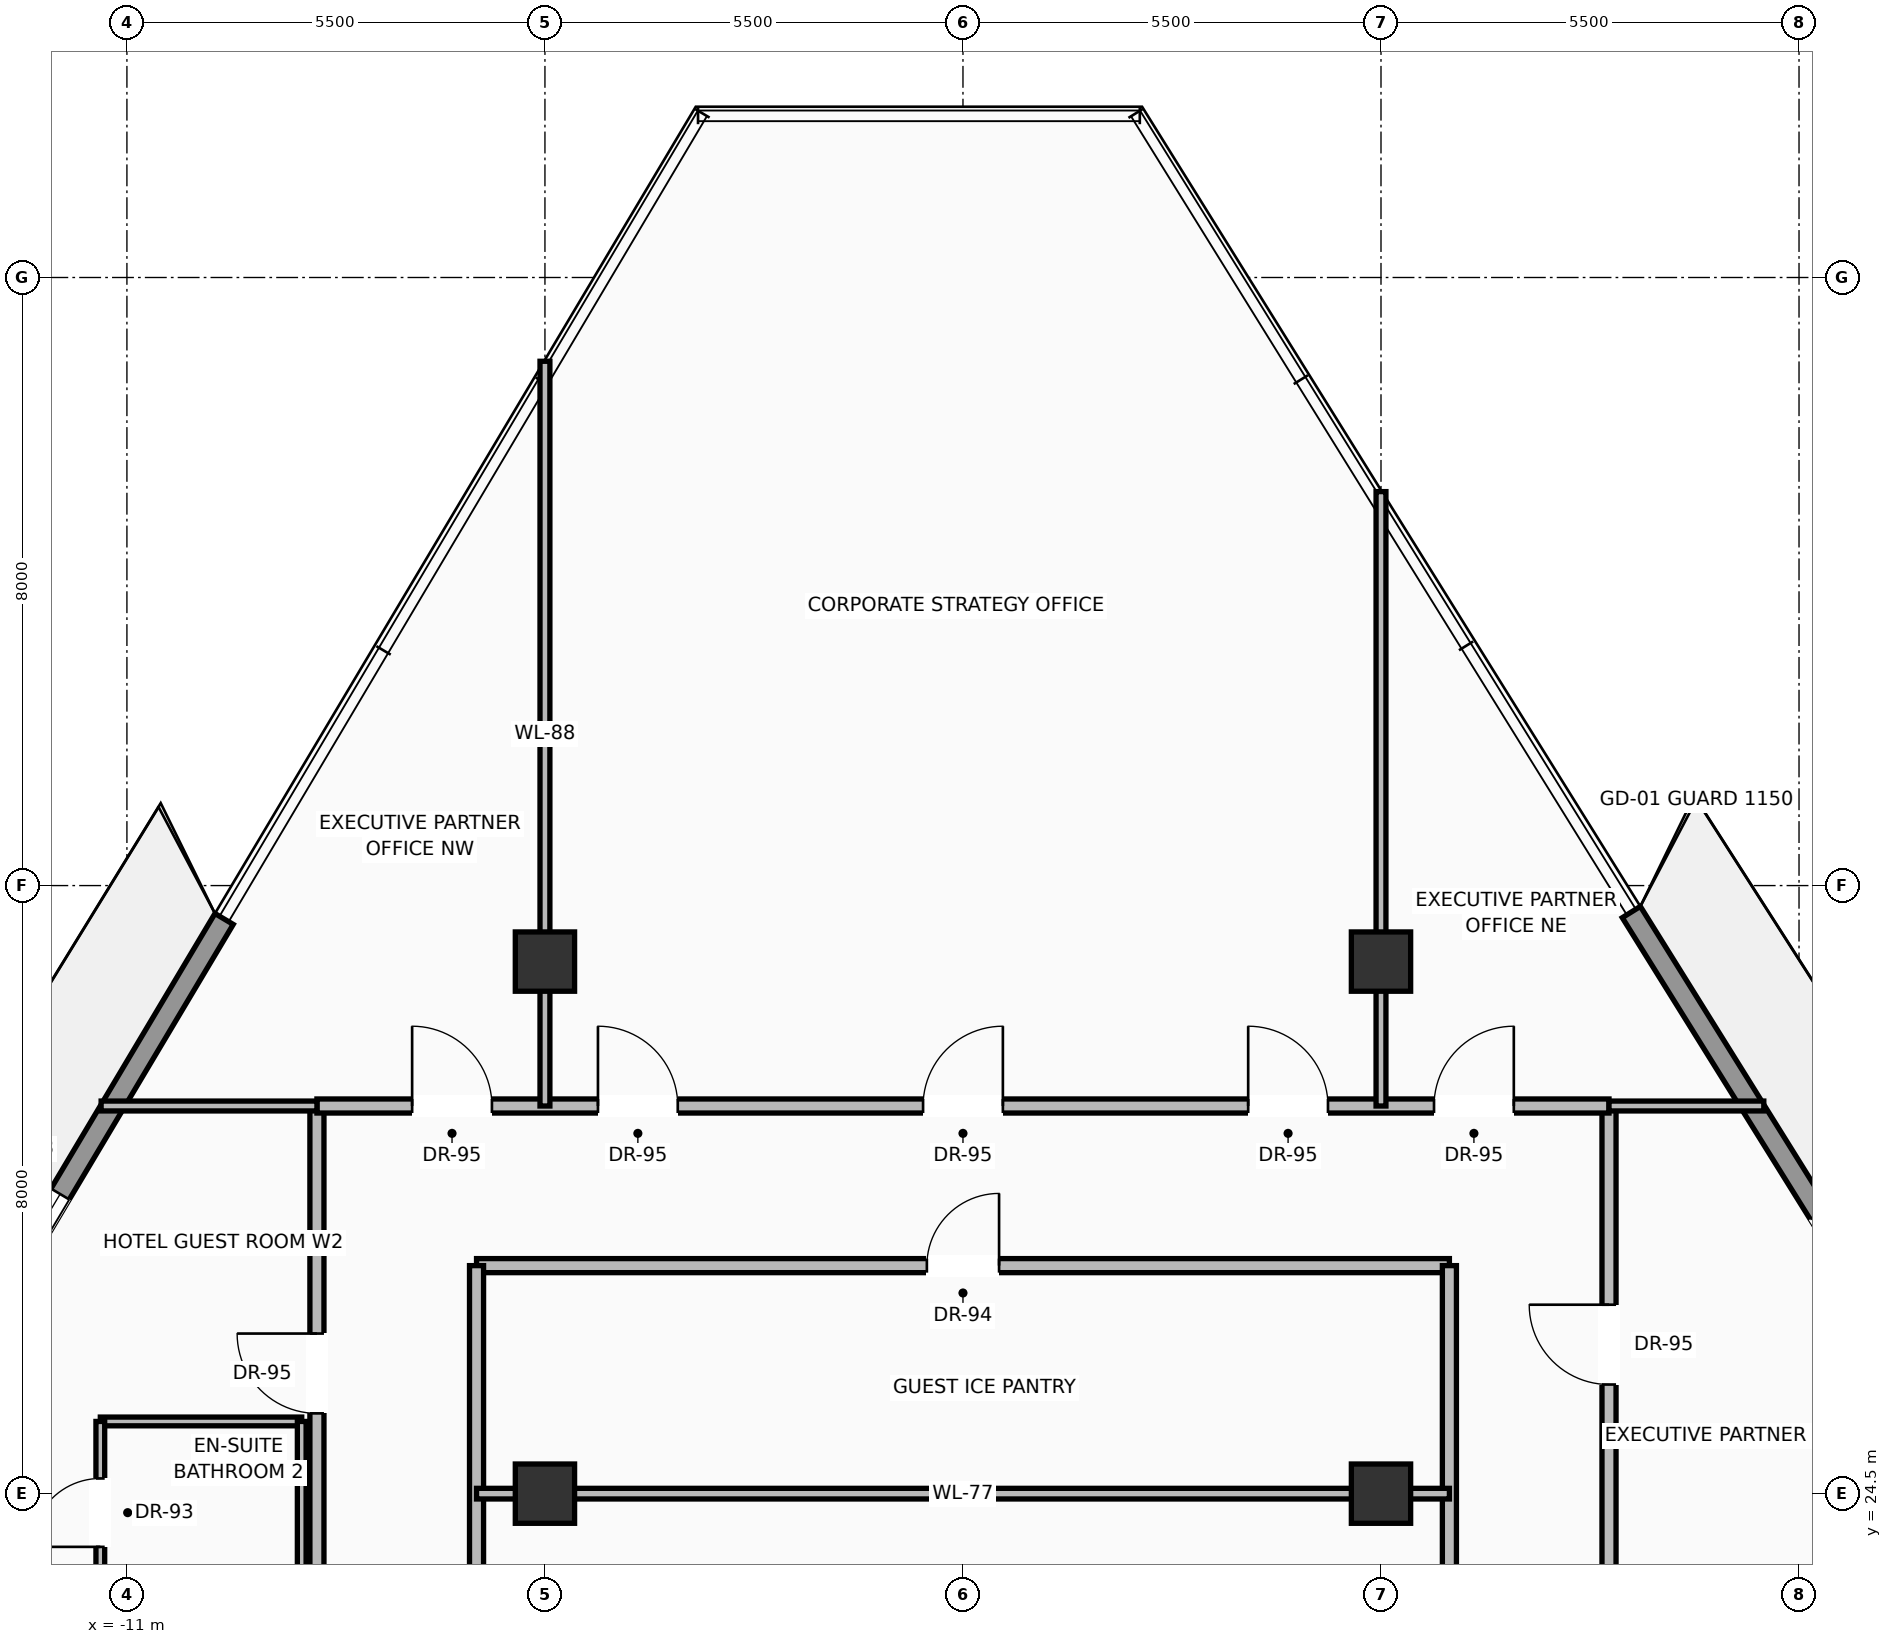
"""IFC4 building model, lengths in metres.
Left out: names, types, materials, properties, quantities, classifications, styles, units other than length and angle.
Written with IfcOpenShell. Run it as: python <this file> out.ifc"""

import sys

from ifc_helpers import new_model, si_unit, direction, frame, frame_2d, origin, origin_2d, place, context, subcontext, project, spatial, rectangle, extrude, source, transform, mapped, element, fill, save


model = new_model("IFC4")
c1 = context("Model", 3, precision=1e-05, world=origin(), true_north=direction((0.0, 1.0)))
c2 = subcontext(c1, "Body", "Model", "MODEL_VIEW")
j1 = project(units=[si_unit("LENGTHUNIT", "METRE"), si_unit("PLANEANGLEUNIT", "RADIAN")], contexts=[c1])
p1 = place(None, origin())
s1 = spatial("IfcSite", under=j1, at=p1, CompositionType="ELEMENT")
p2 = place(p1, origin())
s2 = spatial("IfcBuilding", under=s1, at=p2, CompositionType="ELEMENT")
p3 = place(p2, frame((0.0, 0.0, 226.9)))
s3 = spatial("IfcBuildingStorey", under=s2, at=p3, CompositionType="ELEMENT", Elevation=226.9)
m1 = source(origin(), c2, "Body", "SweptSolid", [
    extrude(rectangle(XDim=0.78, YDim=0.78, at=origin_2d()), origin(), (0.0, 0.0, 1.0), 3.45),
])
for number, where, z_axis, x_axis in (
    (1, (-5.5, 24.5, 0.0), (0.0, 0.0, 1.0), (1.0, 0.0, 0.0)),
    (2, (5.5, 24.5, 0.0), (0.0, 0.0, 1.0), (1.0, 0.0, 0.0)),
    (3, (-5.5, 31.5, 0.0), (0.0, 0.0, 1.0), (1.0, 0.0, 0.0)),
    (4, (5.5, 31.5, 0.0), (0.0, 0.0, 1.0), (1.0, 0.0, 0.0)),
):
    element("IfcColumn", number, at=place(p3, frame(where, z_axis=z_axis, x_axis=x_axis)), inside=s3, PredefinedType="COLUMN", context=c2, shape_type="MappedRepresentation", body=[
        mapped(m1, transform((0.0, 0.0, 0.0), scale=1.0)),
    ])
p4 = place(p3, frame((-19.662, 15.382, 0.0), z_axis=(0.0, 0.0, 1.0), x_axis=(0.511952859747, 0.859013544361, 0.0)))
e5 = element("IfcWall", 5, at=p4, inside=s3, PredefinedType="SOLIDWALL", context=c2, shape_type="SweptSolid", body=[
    extrude(rectangle(XDim=19.417, YDim=0.28, at=frame_2d((9.708, 0.0))), origin(), (0.0, 0.0, 1.0), 2.82),
])
p5 = place(p4, frame((4.66, 0.0, 0.0)))
e6 = element("IfcOpeningElement", 6, at=p5, cuts=e5, PredefinedType="OPENING", context=c2, shape_type="SweptSolid", body=[
    extrude(rectangle(XDim=1.6, YDim=2.35, at=frame_2d((0.8, 1.175))), frame((0.0, 0.15, 0.0), z_axis=(0.0, -1.0, 0.0), x_axis=(1.0, 0.0, 0.0)), (0.0, 0.0, 1.0), 0.3),
])
p6 = place(p4, frame((13.203, 0.0, 0.9)))
e7 = element("IfcOpeningElement", 7, at=p6, cuts=e5, PredefinedType="OPENING", context=c2, shape_type="SweptSolid", body=[
    extrude(rectangle(XDim=2.0, YDim=1.75, at=frame_2d((1.0, 0.875))), frame((0.0, 0.15, 0.0), z_axis=(0.0, -1.0, 0.0), x_axis=(1.0, 0.0, 0.0)), (0.0, 0.0, 1.0), 0.3),
])
p7 = place(p3, frame((8.793, 32.152, 0.0), z_axis=(0.0, 0.0, 1.0), x_axis=(0.528841469928, -0.848720625226, 0.0)))
e8 = element("IfcWall", 8, at=p7, inside=s3, PredefinedType="SOLIDWALL", context=c2, shape_type="SweptSolid", body=[
    extrude(rectangle(XDim=19.48, YDim=0.28, at=frame_2d((9.74, 0.0))), origin(), (0.0, 0.0, 1.0), 2.82),
])
p8 = place(p7, frame((4.675, 0.0, 0.0)))
e9 = element("IfcOpeningElement", 9, at=p8, cuts=e8, PredefinedType="OPENING", context=c2, shape_type="SweptSolid", body=[
    extrude(rectangle(XDim=1.6, YDim=2.35, at=frame_2d((0.8, 1.175))), frame((0.0, 0.15, 0.0), z_axis=(0.0, -1.0, 0.0), x_axis=(1.0, 0.0, 0.0)), (0.0, 0.0, 1.0), 0.3),
])
p9 = place(p7, frame((13.246, 0.0, 0.9)))
e10 = element("IfcOpeningElement", 10, at=p9, cuts=e8, PredefinedType="OPENING", context=c2, shape_type="SweptSolid", body=[
    extrude(rectangle(XDim=2.0, YDim=1.75, at=frame_2d((1.0, 0.875))), frame((0.0, 0.15, 0.0), z_axis=(0.0, -1.0, 0.0), x_axis=(1.0, 0.0, 0.0)), (0.0, 0.0, 1.0), 0.3),
])
p10 = place(p3, frame((-6.4, 27.5, 0.0), z_axis=(0.0, 0.0, 1.0), x_axis=(1.0, 0.0, 0.0)))
e11 = element("IfcWall", 11, at=p10, inside=s3, PredefinedType="PARTITIONING", context=c2, shape_type="SweptSolid", body=[
    extrude(rectangle(XDim=12.8, YDim=0.185, at=frame_2d((6.4, 0.0))), origin(), (0.0, 0.0, 1.0), 3.232),
])
p11 = place(p10, frame((5.925, 0.0, 0.0)))
e12 = element("IfcOpeningElement", 12, at=p11, cuts=e11, PredefinedType="OPENING", context=c2, shape_type="SweptSolid", body=[
    extrude(rectangle(XDim=0.95, YDim=2.2, at=frame_2d((0.475, 1.1))), frame((0.0, 0.103, 0.0), z_axis=(0.0, -1.0, 0.0), x_axis=(1.0, 0.0, 0.0)), (0.0, 0.0, 1.0), 0.205),
])
for number, where, z_axis, x_axis in (
    (13, (-6.4, 18.4, 0.0), (0.0, 0.0, 1.0), (0.0, 1.0, 0.0)),
    (14, (6.4, 18.4, 0.0), (0.0, 0.0, 1.0), (0.0, 1.0, 0.0)),
):
    element("IfcWall", number, at=place(p3, frame(where, z_axis=z_axis, x_axis=x_axis)), inside=s3, PredefinedType="PARTITIONING", context=c2, shape_type="SweptSolid", body=[
        extrude(rectangle(XDim=9.1, YDim=0.185, at=frame_2d((4.55, 0.0))), origin(), (0.0, 0.0, 1.0), 3.232),
    ])
p12 = place(p3, frame((-8.5, 16.3, 0.0), z_axis=(0.0, 0.0, 1.0), x_axis=(0.0, 1.0, 0.0)))
e15 = element("IfcWall", 15, at=p12, inside=s3, PredefinedType="PARTITIONING", context=c2, shape_type="SweptSolid", body=[
    extrude(rectangle(XDim=13.3, YDim=0.185, at=frame_2d((6.65, 0.0))), origin(), (0.0, 0.0, 1.0), 3.232),
])
p13 = place(p12, frame((3.136, 0.0, 0.0)))
e16 = element("IfcOpeningElement", 16, at=p13, cuts=e15, PredefinedType="OPENING", context=c2, shape_type="SweptSolid", body=[
    extrude(rectangle(XDim=1.05, YDim=2.25, at=frame_2d((0.525, 1.125))), frame((0.0, 0.103, 0.0), z_axis=(0.0, -1.0, 0.0), x_axis=(1.0, 0.0, 0.0)), (0.0, 0.0, 1.0), 0.205),
])
p14 = place(p12, frame((9.256, 0.0, 0.0)))
e17 = element("IfcOpeningElement", 17, at=p14, cuts=e15, PredefinedType="OPENING", context=c2, shape_type="SweptSolid", body=[
    extrude(rectangle(XDim=1.05, YDim=2.25, at=frame_2d((0.525, 1.125))), frame((0.0, 0.103, 0.0), z_axis=(0.0, -1.0, 0.0), x_axis=(1.0, 0.0, 0.0)), (0.0, 0.0, 1.0), 0.205),
])
p15 = place(p3, frame((8.5, 16.3, 0.0), z_axis=(0.0, 0.0, 1.0), x_axis=(0.0, 1.0, 0.0)))
e18 = element("IfcWall", 18, at=p15, inside=s3, PredefinedType="PARTITIONING", context=c2, shape_type="SweptSolid", body=[
    extrude(rectangle(XDim=13.3, YDim=0.185, at=frame_2d((6.65, 0.0))), origin(), (0.0, 0.0, 1.0), 3.232),
])
p16 = place(p15, frame((3.136, 0.0, 0.0)))
e19 = element("IfcOpeningElement", 19, at=p16, cuts=e18, PredefinedType="OPENING", context=c2, shape_type="SweptSolid", body=[
    extrude(rectangle(XDim=1.05, YDim=2.25, at=frame_2d((0.525, 1.125))), frame((0.0, 0.103, 0.0), z_axis=(0.0, -1.0, 0.0), x_axis=(1.0, 0.0, 0.0)), (0.0, 0.0, 1.0), 0.205),
])
p17 = place(p15, frame((9.636, 0.0, 0.0)))
e20 = element("IfcOpeningElement", 20, at=p17, cuts=e18, PredefinedType="OPENING", context=c2, shape_type="SweptSolid", body=[
    extrude(rectangle(XDim=1.05, YDim=2.25, at=frame_2d((0.525, 1.125))), frame((0.0, 0.103, 0.0), z_axis=(0.0, -1.0, 0.0), x_axis=(1.0, 0.0, 0.0)), (0.0, 0.0, 1.0), 0.205),
])
p18 = place(p3, frame((-8.5, 29.6, 0.0), z_axis=(0.0, 0.0, 1.0), x_axis=(1.0, 0.0, 0.0)))
e21 = element("IfcWall", 21, at=p18, inside=s3, PredefinedType="PARTITIONING", context=c2, shape_type="SweptSolid", body=[
    extrude(rectangle(XDim=17.0, YDim=0.185, at=frame_2d((8.5, 0.0))), origin(), (0.0, 0.0, 1.0), 3.232),
])
p19 = place(p18, frame((3.698, 0.0, 0.0)))
e22 = element("IfcOpeningElement", 22, at=p19, cuts=e21, PredefinedType="OPENING", context=c2, shape_type="SweptSolid", body=[
    extrude(rectangle(XDim=1.05, YDim=2.25, at=frame_2d((0.525, 1.125))), frame((0.0, 0.103, 0.0), z_axis=(0.0, -1.0, 0.0), x_axis=(1.0, 0.0, 0.0)), (0.0, 0.0, 1.0), 0.205),
])
p20 = place(p18, frame((7.975, 0.0, 0.0)))
e23 = element("IfcOpeningElement", 23, at=p20, cuts=e21, PredefinedType="OPENING", context=c2, shape_type="SweptSolid", body=[
    extrude(rectangle(XDim=1.05, YDim=2.25, at=frame_2d((0.525, 1.125))), frame((0.0, 0.103, 0.0), z_axis=(0.0, -1.0, 0.0), x_axis=(1.0, 0.0, 0.0)), (0.0, 0.0, 1.0), 0.205),
])
p21 = place(p18, frame((12.252, 0.0, 0.0)))
e24 = element("IfcOpeningElement", 24, at=p21, cuts=e21, PredefinedType="OPENING", context=c2, shape_type="SweptSolid", body=[
    extrude(rectangle(XDim=1.05, YDim=2.25, at=frame_2d((0.525, 1.125))), frame((0.0, 0.103, 0.0), z_axis=(0.0, -1.0, 0.0), x_axis=(1.0, 0.0, 0.0)), (0.0, 0.0, 1.0), 0.205),
])
p22 = place(p18, frame((14.698, 0.0, 0.0)))
e25 = element("IfcOpeningElement", 25, at=p22, cuts=e21, PredefinedType="OPENING", context=c2, shape_type="SweptSolid", body=[
    extrude(rectangle(XDim=1.05, YDim=2.25, at=frame_2d((0.525, 1.125))), frame((0.0, 0.103, 0.0), z_axis=(0.0, -1.0, 0.0), x_axis=(1.0, 0.0, 0.0)), (0.0, 0.0, 1.0), 0.205),
])
p23 = place(p18, frame((1.252, 0.0, 0.0)))
e26 = element("IfcOpeningElement", 26, at=p23, cuts=e21, PredefinedType="OPENING", context=c2, shape_type="SweptSolid", body=[
    extrude(rectangle(XDim=1.05, YDim=2.25, at=frame_2d((0.525, 1.125))), frame((0.0, 0.103, 0.0), z_axis=(0.0, -1.0, 0.0), x_axis=(1.0, 0.0, 0.0)), (0.0, 0.0, 1.0), 0.205),
])
p24 = place(p3, frame((-6.4, 24.5, 0.0), z_axis=(0.0, 0.0, 1.0), x_axis=(1.0, 0.0, 0.0)))
e27 = element("IfcWall", 27, at=p24, inside=s3, PredefinedType="PARTITIONING", context=c2, shape_type="SweptSolid", body=[
    extrude(rectangle(XDim=12.8, YDim=0.14, at=frame_2d((6.4, 0.0))), origin(), (0.0, 0.0, 1.0), 2.683),
])
p25 = place(p3, frame((-11.339, 29.6, 0.0), z_axis=(0.0, 0.0, 1.0), x_axis=(1.0, 0.0, 0.0)))
e28 = element("IfcWall", 28, at=p25, inside=s3, PredefinedType="PARTITIONING", context=c2, shape_type="SweptSolid", body=[
    extrude(rectangle(XDim=2.839, YDim=0.13, at=frame_2d((1.42, 0.0))), origin(), (0.0, 0.0, 1.0), 3.232),
])
p26 = place(p3, frame((8.5, 29.6, 0.0), z_axis=(0.0, 0.0, 1.0), x_axis=(1.0, 0.0, 0.0)))
e29 = element("IfcWall", 29, at=p26, inside=s3, PredefinedType="PARTITIONING", context=c2, shape_type="SweptSolid", body=[
    extrude(rectangle(XDim=2.037, YDim=0.13, at=frame_2d((1.018, 0.0))), origin(), (0.0, 0.0, 1.0), 3.232),
])
p27 = place(p3, frame((-5.5, 29.6, 0.0), z_axis=(0.0, 0.0, 1.0), x_axis=(0.0, 1.0, 0.0)))
e30 = element("IfcWall", 30, at=p27, inside=s3, PredefinedType="PARTITIONING", context=c2, shape_type="SweptSolid", body=[
    extrude(rectangle(XDim=9.798, YDim=0.13, at=frame_2d((4.899, 0.0))), origin(), (0.0, 0.0, 1.0), 2.683),
])
p28 = place(p3, frame((5.5, 29.6, 0.0), z_axis=(0.0, 0.0, 1.0), x_axis=(0.0, 1.0, 0.0)))
e31 = element("IfcWall", 31, at=p28, inside=s3, PredefinedType="PARTITIONING", context=c2, shape_type="SweptSolid", body=[
    extrude(rectangle(XDim=8.083, YDim=0.13, at=frame_2d((4.042, 0.0))), origin(), (0.0, 0.0, 1.0), 2.683),
])
p29 = place(p3, frame((-11.35, 25.45, 0.0), z_axis=(0.0, 0.0, 1.0), x_axis=(1.0, 0.0, 0.0)))
e32 = element("IfcWall", 32, at=p29, inside=s3, PredefinedType="PARTITIONING", context=c2, shape_type="SweptSolid", body=[
    extrude(rectangle(XDim=2.65, YDim=0.115, at=frame_2d((1.325, 0.0))), origin(), (0.0, 0.0, 1.0), 3.232),
])
p30 = place(p3, frame((-11.35, 23.05, 0.0), z_axis=(0.0, 0.0, 1.0), x_axis=(0.0, 1.0, 0.0)))
e33 = element("IfcWall", 33, at=p30, inside=s3, PredefinedType="PARTITIONING", context=c2, shape_type="SweptSolid", body=[
    extrude(rectangle(XDim=2.4, YDim=0.115, at=frame_2d((1.2, 0.0))), origin(), (0.0, 0.0, 1.0), 3.232),
])
p31 = place(p30, frame((0.75, 0.0, 0.0)))
e34 = element("IfcOpeningElement", 34, at=p31, cuts=e33, PredefinedType="OPENING", context=c2, shape_type="SweptSolid", body=[
    extrude(rectangle(XDim=0.9, YDim=2.15, at=frame_2d((0.45, 1.075))), frame((0.0, 0.067, 0.0), z_axis=(0.0, -1.0, 0.0), x_axis=(1.0, 0.0, 0.0)), (0.0, 0.0, 1.0), 0.135),
])
p32 = place(p3, frame((-8.7, 23.05, 0.0), z_axis=(0.0, 0.0, 1.0), x_axis=(0.0, 1.0, 0.0)))
e35 = element("IfcWall", 35, at=p32, inside=s3, PredefinedType="PARTITIONING", context=c2, shape_type="SweptSolid", body=[
    extrude(rectangle(XDim=2.4, YDim=0.115, at=frame_2d((1.2, 0.0))), origin(), (0.0, 0.0, 1.0), 3.232),
])
m2 = source(origin(), c2, "Body", "SweptSolid", [
    extrude(rectangle(XDim=2.0, YDim=1.75, at=frame_2d((1.0, 0.875))), frame((0.0, 0.03, 0.0), z_axis=(0.0, -1.0, 0.0), x_axis=(1.0, 0.0, 0.0)), (0.0, 0.0, 1.0), 0.06),
])
p33 = place(p6, origin())
e36 = element("IfcWindow", 36, at=p33, inside=s3, PartitioningType="SINGLE_PANEL", PredefinedType="WINDOW", context=c2, shape_type="MappedRepresentation", body=[
    mapped(m2, transform((0.0, 0.0, 0.0), scale=1.0)),
])
fill(e7, e36)
m3 = source(origin(), c2, "Body", "SweptSolid", [
    extrude(rectangle(XDim=0.95, YDim=2.2, at=frame_2d((0.475, 1.1))), frame((0.0, 0.025, 0.0), z_axis=(0.0, -1.0, 0.0), x_axis=(1.0, 0.0, 0.0)), (0.0, 0.0, 1.0), 0.05),
])
p34 = place(p11, origin())
e37 = element("IfcDoor", 37, at=p34, inside=s3, OperationType="SINGLE_SWING_RIGHT", PredefinedType="DOOR", context=c2, shape_type="MappedRepresentation", body=[
    mapped(m3, transform((0.0, 0.0, 0.0), scale=1.0)),
])
fill(e12, e37)
m4 = source(origin(), c2, "Body", "SweptSolid", [
    extrude(rectangle(XDim=1.05, YDim=2.25, at=frame_2d((0.525, 1.125))), frame((0.0, 0.025, 0.0), z_axis=(0.0, -1.0, 0.0), x_axis=(1.0, 0.0, 0.0)), (0.0, 0.0, 1.0), 0.05),
])
p35 = place(p14, origin())
e38 = element("IfcDoor", 38, at=p35, inside=s3, OperationType="SINGLE_SWING_RIGHT", PredefinedType="DOOR", context=c2, shape_type="MappedRepresentation", body=[
    mapped(m4, transform((0.0, 0.0, 0.0), scale=1.0)),
])
fill(e17, e38)
m5 = source(origin(), c2, "Body", "SweptSolid", [
    extrude(rectangle(XDim=0.9, YDim=2.15, at=frame_2d((0.45, 1.075))), frame((0.0, 0.025, 0.0), z_axis=(0.0, -1.0, 0.0), x_axis=(1.0, 0.0, 0.0)), (0.0, 0.0, 1.0), 0.05),
])
p36 = place(p31, origin())
e39 = element("IfcDoor", 39, at=p36, inside=s3, OperationType="SINGLE_SWING_LEFT", PredefinedType="DOOR", context=c2, shape_type="MappedRepresentation", body=[
    mapped(m5, transform((0.0, 0.0, 0.0), scale=1.0)),
])
fill(e34, e39)
p37 = place(p17, origin())
e40 = element("IfcDoor", 40, at=p37, inside=s3, OperationType="SINGLE_SWING_RIGHT", PredefinedType="DOOR", context=c2, shape_type="MappedRepresentation", body=[
    mapped(m4, transform((0.0, 0.0, 0.0), scale=1.0)),
])
fill(e20, e40)
p38 = place(p19, origin())
e41 = element("IfcDoor", 41, at=p38, inside=s3, OperationType="SINGLE_SWING_LEFT", PredefinedType="DOOR", context=c2, shape_type="MappedRepresentation", body=[
    mapped(m4, transform((0.0, 0.0, 0.0), scale=1.0)),
])
fill(e22, e41)
p39 = place(p20, origin())
e42 = element("IfcDoor", 42, at=p39, inside=s3, OperationType="SINGLE_SWING_RIGHT", PredefinedType="DOOR", context=c2, shape_type="MappedRepresentation", body=[
    mapped(m4, transform((0.0, 0.0, 0.0), scale=1.0)),
])
fill(e23, e42)
p40 = place(p21, origin())
e43 = element("IfcDoor", 43, at=p40, inside=s3, OperationType="SINGLE_SWING_LEFT", PredefinedType="DOOR", context=c2, shape_type="MappedRepresentation", body=[
    mapped(m4, transform((0.0, 0.0, 0.0), scale=1.0)),
])
fill(e24, e43)
p41 = place(p22, origin())
e44 = element("IfcDoor", 44, at=p41, inside=s3, OperationType="SINGLE_SWING_RIGHT", PredefinedType="DOOR", context=c2, shape_type="MappedRepresentation", body=[
    mapped(m4, transform((0.0, 0.0, 0.0), scale=1.0)),
])
fill(e25, e44)
p42 = place(p23, origin())
e45 = element("IfcDoor", 45, at=p42, inside=s3, OperationType="SINGLE_SWING_LEFT", PredefinedType="DOOR", context=c2, shape_type="MappedRepresentation", body=[
    mapped(m4, transform((0.0, 0.0, 0.0), scale=1.0)),
])
fill(e26, e45)
save(model, sys.argv[1])
